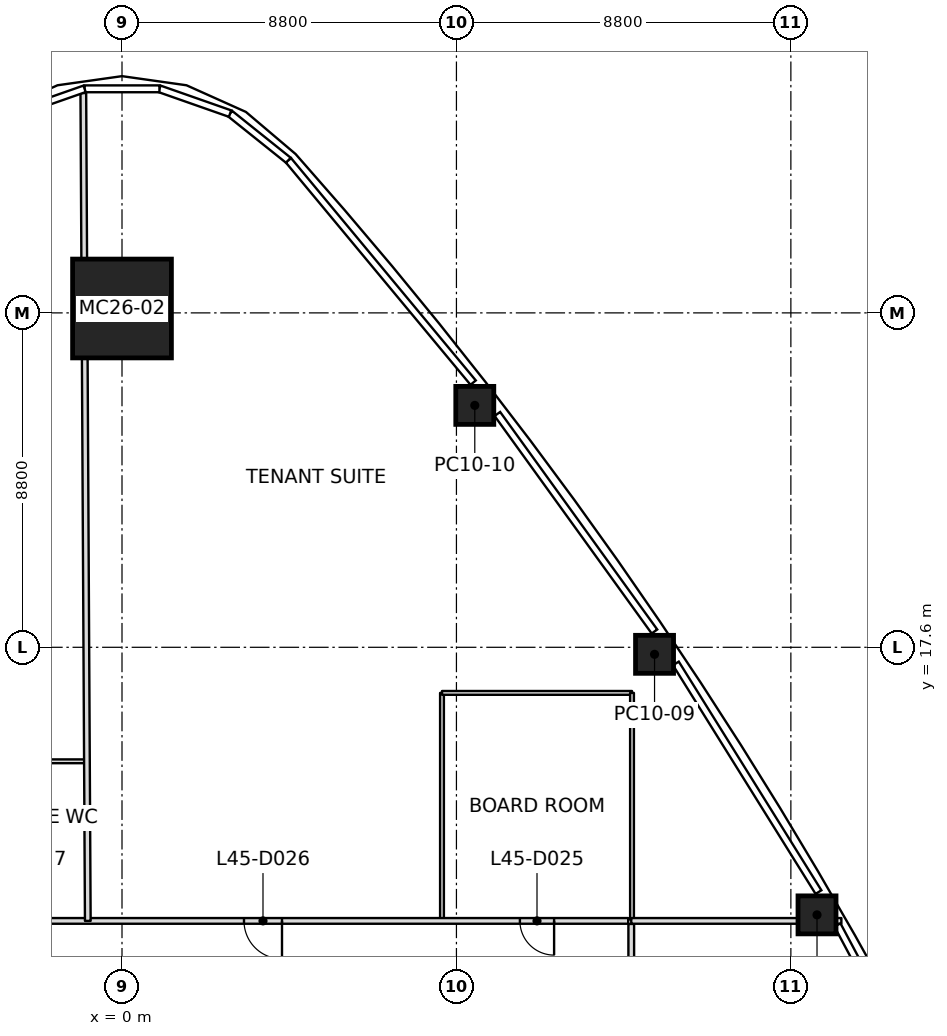
"""IFC4 building model, lengths in metres.
Left out: names, types, materials, properties, quantities, classifications, styles, units other than length and angle.
Written with IfcOpenShell. Run it as: python <this file> out.ifc"""

import sys

from ifc_helpers import new_model, si_unit, direction, frame, frame_2d, origin, origin_2d, place, context, subcontext, project, spatial, rectangle, extrude, element, fill, save


model = new_model("IFC4")
c1 = context("Model", 3, precision=1e-05, world=origin(), true_north=direction((0.0, 1.0)))
c2 = subcontext(c1, "Body", "Model", "MODEL_VIEW")
j1 = project(units=[si_unit("LENGTHUNIT", "METRE"), si_unit("PLANEANGLEUNIT", "RADIAN")], contexts=[c1])
p1 = place(None, origin())
s1 = spatial("IfcSite", under=j1, at=p1, CompositionType="ELEMENT")
p2 = place(p1, origin())
s2 = spatial("IfcBuilding", under=s1, at=p2, CompositionType="ELEMENT")
p3 = place(p2, frame((0.0, 0.0, 201.8)))
s3 = spatial("IfcBuildingStorey", under=s2, at=p3, CompositionType="ELEMENT", Elevation=201.8)
p4 = place(p3, frame((0.0, 26.515, 0.0), z_axis=(0.0, -0.032270781071, 0.999479162709), x_axis=(1.0, 0.0, 0.0)))
e1 = element("IfcColumn", 1, at=p4, inside=s3, PredefinedType="COLUMN", context=c2, shape_type="SweptSolid", body=[
    extrude(rectangle(XDim=2.6, YDim=2.6, at=origin_2d()), origin(), (0.0, 0.0, 1.0), 4.002),
])
p5 = place(p3, frame((18.288, 10.559, 0.0), z_axis=(-0.009948074445, -0.005736926367, 0.999934059571), x_axis=(-0.499975258342, 0.8660396879, -5.385525e-06)))
e2 = element("IfcColumn", 2, at=p5, inside=s3, PredefinedType="COLUMN", context=c2, shape_type="SweptSolid", body=[
    extrude(rectangle(XDim=1.0, YDim=1.0, at=origin_2d()), origin(), (0.0, 0.0, 1.0), 4.0),
])
p6 = place(p3, frame((14.013, 17.415, 0.0), z_axis=(-0.005309522349, -0.013182262383, 0.999899013366), x_axis=(-0.557556155911, 0.830100839547, 0.007983056383)))
e3 = element("IfcColumn", 3, at=p6, inside=s3, PredefinedType="COLUMN", context=c2, shape_type="SweptSolid", body=[
    extrude(rectangle(XDim=1.0, YDim=1.0, at=origin_2d()), origin(), (0.0, 0.0, 1.0), 4.0),
])
p7 = place(p3, frame((9.283, 23.966, 0.0), z_axis=(-0.0002440896, -0.020442503975, 0.999791000385), x_axis=(-0.612560827359, 0.79026131933, 0.016008746256)))
e4 = element("IfcColumn", 4, at=p7, inside=s3, PredefinedType="COLUMN", context=c2, shape_type="SweptSolid", body=[
    extrude(rectangle(XDim=1.0, YDim=1.0, at=origin_2d()), origin(), (0.0, 0.0, 1.0), 4.001),
])
p8 = place(p3, frame((-0.9, 10.4, 0.0), z_axis=(0.0, 0.0, 1.0), x_axis=(-0.005412837739, 0.999985350487, 0.0)))
e5 = element("IfcWall", 5, at=p8, inside=s3, PredefinedType="PARTITIONING", context=c2, shape_type="SweptSolid", body=[
    extrude(rectangle(XDim=21.785, YDim=0.15, at=frame_2d((10.893, 0.0))), origin(), (0.0, 0.0, 1.0), 3.234),
])
p9 = place(p3, frame((13.4, 10.4, 0.0), z_axis=(0.0, 0.0, 1.0), x_axis=(1.0, 0.0, 0.0)))
e6 = element("IfcWall", 6, at=p9, inside=s3, PredefinedType="PARTITIONING", context=c2, shape_type="SweptSolid", body=[
    extrude(rectangle(XDim=5.529, YDim=0.15, at=frame_2d((2.765, 0.0))), origin(), (0.0, 0.0, 1.0), 3.3),
])
p10 = place(p3, frame((13.32, 10.4, 0.0), z_axis=(0.0, 0.0, 1.0), x_axis=(-1.0, 0.0, 0.0)))
e7 = element("IfcWall", 7, at=p10, inside=s3, PredefinedType="PARTITIONING", context=c2, shape_type="SweptSolid", body=[
    extrude(rectangle(XDim=26.64, YDim=0.15, at=frame_2d((13.32, 0.0))), origin(), (0.0, 0.0, 1.0), 3.166),
])
p11 = place(p10, frame((1.95, 0.0, 0.0)))
e8 = element("IfcOpeningElement", 8, at=p11, cuts=e7, PredefinedType="OPENING", context=c2, shape_type="SweptSolid", body=[
    extrude(rectangle(XDim=0.9, YDim=2.1, at=frame_2d((0.45, 1.05))), frame((0.0, 0.075, 0.0), z_axis=(0.0, -1.0, 0.0), x_axis=(1.0, 0.0, 0.0)), (0.0, 0.0, 1.0), 0.15),
])
p12 = place(p10, frame((9.11, 0.0, 0.0)))
e9 = element("IfcOpeningElement", 9, at=p12, cuts=e7, PredefinedType="OPENING", context=c2, shape_type="SweptSolid", body=[
    extrude(rectangle(XDim=1.0, YDim=2.1, at=frame_2d((0.5, 1.05))), frame((0.0, 0.075, 0.0), z_axis=(0.0, -1.0, 0.0), x_axis=(1.0, 0.0, 0.0)), (0.0, 0.0, 1.0), 0.15),
])
p13 = place(p10, frame((15.57, 0.0, 0.0)))
e10 = element("IfcOpeningElement", 10, at=p13, cuts=e7, PredefinedType="OPENING", context=c2, shape_type="SweptSolid", body=[
    extrude(rectangle(XDim=0.9, YDim=2.1, at=frame_2d((0.45, 1.05))), frame((0.0, 0.075, 0.0), z_axis=(0.0, -1.0, 0.0), x_axis=(1.0, 0.0, 0.0)), (0.0, 0.0, 1.0), 0.15),
])
p14 = place(p10, frame((21.83, 0.0, 0.0)))
e11 = element("IfcOpeningElement", 11, at=p14, cuts=e7, PredefinedType="OPENING", context=c2, shape_type="SweptSolid", body=[
    extrude(rectangle(XDim=1.0, YDim=2.1, at=frame_2d((0.5, 1.05))), frame((0.0, 0.075, 0.0), z_axis=(0.0, -1.0, 0.0), x_axis=(1.0, 0.0, 0.0)), (0.0, 0.0, 1.0), 0.15),
])
p15 = place(p3, frame((13.4, -10.32, 0.0), z_axis=(0.0, 0.0, 1.0), x_axis=(0.0, 1.0, 0.0)))
e12 = element("IfcWall", 12, at=p15, inside=s3, PredefinedType="PARTITIONING", context=c2, shape_type="SweptSolid", body=[
    extrude(rectangle(XDim=20.64, YDim=0.15, at=frame_2d((10.32, 0.0))), origin(), (0.0, 0.0, 1.0), 3.166),
])
p16 = place(p15, frame((15.47, 0.0, 0.0)))
e13 = element("IfcOpeningElement", 13, at=p16, cuts=e12, PredefinedType="OPENING", context=c2, shape_type="SweptSolid", body=[
    extrude(rectangle(XDim=1.0, YDim=2.1, at=frame_2d((0.5, 1.05))), frame((0.0, 0.075, 0.0), z_axis=(0.0, -1.0, 0.0), x_axis=(1.0, 0.0, 0.0)), (0.0, 0.0, 1.0), 0.15),
])
p17 = place(p15, frame((1.95, 0.0, 0.0)))
e14 = element("IfcOpeningElement", 14, at=p17, cuts=e12, PredefinedType="OPENING", context=c2, shape_type="SweptSolid", body=[
    extrude(rectangle(XDim=0.9, YDim=2.1, at=frame_2d((0.45, 1.05))), frame((0.0, 0.075, 0.0), z_axis=(0.0, -1.0, 0.0), x_axis=(1.0, 0.0, 0.0)), (0.0, 0.0, 1.0), 0.15),
])
p18 = place(p15, frame((7.61, 0.0, 0.0)))
e15 = element("IfcOpeningElement", 15, at=p18, cuts=e12, PredefinedType="OPENING", context=c2, shape_type="SweptSolid", body=[
    extrude(rectangle(XDim=1.0, YDim=2.1, at=frame_2d((0.5, 1.05))), frame((0.0, 0.075, 0.0), z_axis=(0.0, -1.0, 0.0), x_axis=(1.0, 0.0, 0.0)), (0.0, 0.0, 1.0), 0.15),
])
p19 = place(p3, frame((-4.5, 14.6, 0.0), z_axis=(0.0, 0.0, 1.0), x_axis=(1.0, 0.0, 0.0)))
e16 = element("IfcWall", 16, at=p19, inside=s3, PredefinedType="PARTITIONING", context=c2, shape_type="SweptSolid", body=[
    extrude(rectangle(XDim=3.57, YDim=0.1, at=frame_2d((1.785, 0.0))), origin(), (0.0, 0.0, 1.0), 3.3),
])
p20 = place(p3, frame((8.42, 10.43, 0.0), z_axis=(0.0, 0.0, 1.0), x_axis=(0.0, 1.0, 0.0)))
e17 = element("IfcWall", 17, at=p20, inside=s3, PredefinedType="PARTITIONING", context=c2, shape_type="SweptSolid", body=[
    extrude(rectangle(XDim=5.97, YDim=0.1, at=frame_2d((2.985, 0.0))), origin(), (0.0, 0.0, 1.0), 3.3),
])
p21 = place(p3, frame((8.42, 16.4, 0.0), z_axis=(0.0, 0.0, 1.0), x_axis=(1.0, 0.0, 0.0)))
e18 = element("IfcWall", 18, at=p21, inside=s3, PredefinedType="PARTITIONING", context=c2, shape_type="SweptSolid", body=[
    extrude(rectangle(XDim=5.0, YDim=0.1, at=frame_2d((2.5, 0.0))), origin(), (0.0, 0.0, 1.0), 3.3),
])
p22 = place(p3, frame((13.42, 16.4, 0.0), z_axis=(0.0, 0.0, 1.0), x_axis=(0.0, -1.0, 0.0)))
e19 = element("IfcWall", 19, at=p22, inside=s3, PredefinedType="PARTITIONING", context=c2, shape_type="SweptSolid", body=[
    extrude(rectangle(XDim=5.97, YDim=0.1, at=frame_2d((2.985, 0.0))), origin(), (0.0, 0.0, 1.0), 3.3),
])
p23 = place(p11, origin())
e20 = element("IfcDoor", 20, at=p23, inside=s3, OperationType="SINGLE_SWING_RIGHT", PredefinedType="DOOR", context=c2, shape_type="SweptSolid", body=[
    extrude(rectangle(XDim=0.9, YDim=2.1, at=frame_2d((0.45, 1.05))), frame((0.0, 0.025, 0.0), z_axis=(0.0, -1.0, 0.0), x_axis=(1.0, 0.0, 0.0)), (0.0, 0.0, 1.0), 0.05),
])
fill(e8, e20)
p24 = place(p12, origin())
e21 = element("IfcDoor", 21, at=p24, inside=s3, OperationType="SINGLE_SWING_LEFT", PredefinedType="DOOR", context=c2, shape_type="SweptSolid", body=[
    extrude(rectangle(XDim=1.0, YDim=2.1, at=frame_2d((0.5, 1.05))), frame((0.0, 0.025, 0.0), z_axis=(0.0, -1.0, 0.0), x_axis=(1.0, 0.0, 0.0)), (0.0, 0.0, 1.0), 0.05),
])
fill(e9, e21)
save(model, sys.argv[1])
